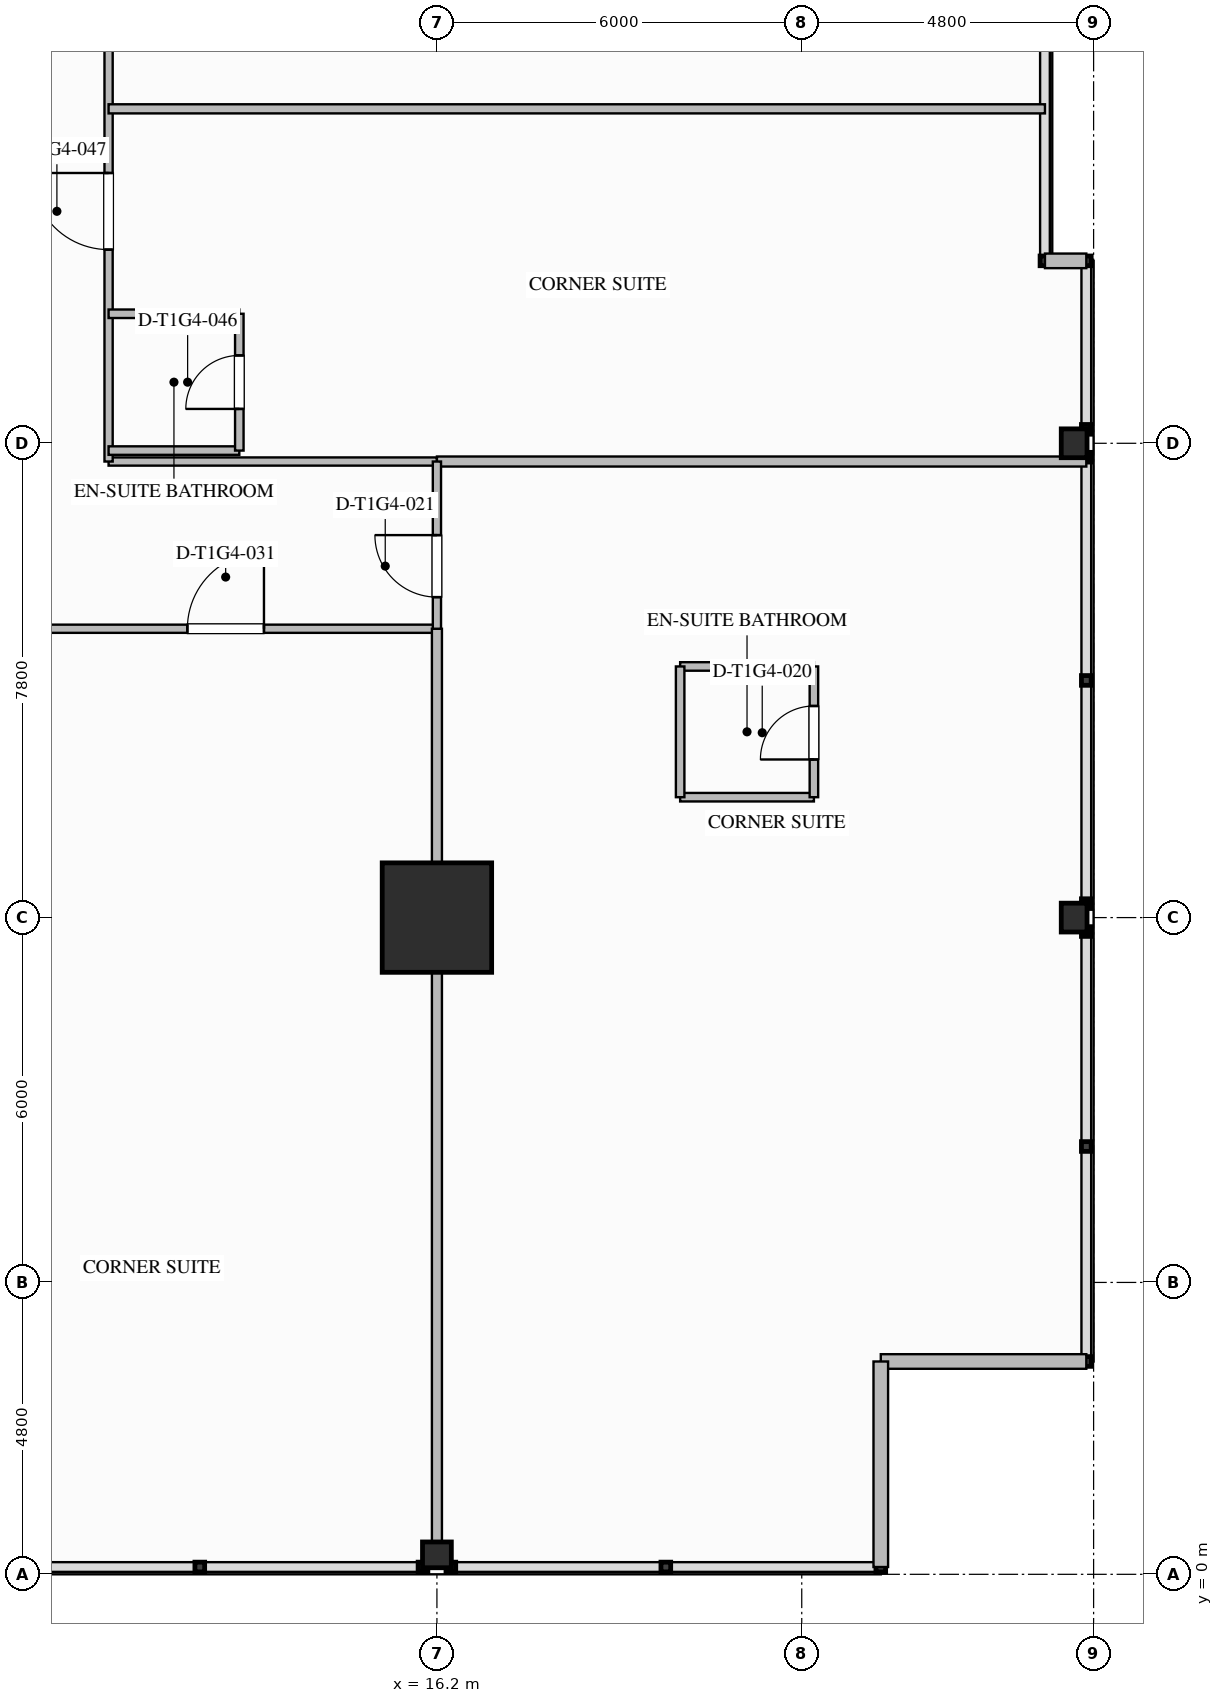
"""IFC4 building model, lengths in metres.
Left out: names, types, materials, properties, quantities, classifications, styles, units other than length and angle.
Written with IfcOpenShell. Run it as: python <this file> out.ifc"""

import sys

from ifc_helpers import new_model, si_unit, direction, frame, frame_2d, origin, origin_2d, place, context, subcontext, project, spatial, rectangle, i_section, extrude, element, fill, save


model = new_model("IFC4")
c1 = context("Model", 3, precision=1e-05, world=origin(), true_north=direction((0.0, 1.0)))
c2 = subcontext(c1, "Body", "Model", "MODEL_VIEW")
j1 = project(units=[si_unit("LENGTHUNIT", "METRE"), si_unit("PLANEANGLEUNIT", "RADIAN")], contexts=[c1])
p1 = place(None, origin())
s1 = spatial("IfcSite", under=j1, at=p1, CompositionType="ELEMENT")
p2 = place(p1, origin())
s2 = spatial("IfcBuilding", under=s1, at=p2, CompositionType="ELEMENT")
p3 = place(p2, frame((0.0, 0.0, 64.7)))
s3 = spatial("IfcBuildingStorey", under=s2, at=p3, CompositionType="ELEMENT", Elevation=64.7)
p4 = place(p3, frame((16.2, 10.8, 0.0), z_axis=(0.0, 0.0, 1.0), x_axis=(1.0, 0.0, 0.0)))
e1 = element("IfcColumn", 1, at=p4, inside=s3, PredefinedType="COLUMN", context=c2, shape_type="SweptSolid", body=[
    extrude(rectangle(XDim=1.8, YDim=1.8, at=origin_2d()), origin(), (0.0, 0.0, 1.0), 3.5),
])
for number, where, z_axis, x_axis in (
    (2, (26.68, 10.8, 0.0), (0.0, 0.0, 1.0), (1.0, 0.0, 0.0)),
    (3, (26.68, 18.6, 0.0), (0.0, 0.0, 1.0), (1.0, 0.0, 0.0)),
    (4, (16.2, 0.32, 0.0), (0.0, 0.0, 1.0), (0.0, 1.0, 0.0)),
):
    element("IfcColumn", number, at=place(p3, frame(where, z_axis=z_axis, x_axis=x_axis)), inside=s3, PredefinedType="COLUMN", context=c2, shape_type="SweptSolid", body=[
        extrude(i_section(OverallWidth=0.424, OverallDepth=0.474, WebThickness=0.048, FlangeThickness=0.077, FilletRadius=0.03, at=origin_2d()), origin(), (0.0, 0.0, 1.0), 3.497),
    ])
for number, where, z_axis, x_axis in (
    (5, (26.88, 3.5, 0.0), (0.0, 0.0, 1.0), (-1.0, 0.0, 0.0)),
    (6, (23.5, 3.5, 0.0), (0.0, 0.0, 1.0), (0.0, -1.0, 0.0)),
):
    element("IfcWall", number, at=place(p3, frame(where, z_axis=z_axis, x_axis=x_axis)), inside=s3, PredefinedType="STANDARD", context=c2, shape_type="SweptSolid", body=[
        extrude(rectangle(XDim=3.38, YDim=0.24, at=frame_2d((1.69, 0.0))), origin(), (0.0, 0.0, 1.0), 3.24),
    ])
p5 = place(p3, frame((26.2, 21.6, 0.0), z_axis=(0.0, 0.0, 1.0), x_axis=(1.0, 0.0, 0.0)))
e7 = element("IfcWall", 7, at=p5, inside=s3, PredefinedType="STANDARD", context=c2, shape_type="SweptSolid", body=[
    extrude(rectangle(XDim=0.68, YDim=0.24, at=frame_2d((0.34, 0.0))), origin(), (0.0, 0.0, 1.0), 3.24),
])
p6 = place(p3, frame((-16.2, 15.55, 0.0), z_axis=(0.0, 0.0, 1.0), x_axis=(1.0, 0.0, 0.0)))
e8 = element("IfcWall", 8, at=p6, inside=s3, PredefinedType="PARTITIONING", context=c2, shape_type="SweptSolid", body=[
    extrude(rectangle(XDim=32.4, YDim=0.135, at=frame_2d((16.2, 0.0))), origin(), (0.0, 0.0, 1.0), 3.24),
])
p7 = place(p6, frame((5.775, 0.0, 0.0)))
e9 = element("IfcOpeningElement", 9, at=p7, cuts=e8, PredefinedType="OPENING", context=c2, shape_type="SweptSolid", body=[
    extrude(rectangle(XDim=1.26, YDim=2.2, at=frame_2d((0.63, 1.1))), frame((0.0, 0.077, 0.0), z_axis=(0.0, -1.0, 0.0), x_axis=(1.0, 0.0, 0.0)), (0.0, 0.0, 1.0), 0.155),
])
p8 = place(p6, frame((17.286, 0.0, 0.0)))
e10 = element("IfcOpeningElement", 10, at=p8, cuts=e8, PredefinedType="OPENING", context=c2, shape_type="SweptSolid", body=[
    extrude(rectangle(XDim=1.26, YDim=2.2, at=frame_2d((0.63, 1.1))), frame((0.0, 0.077, 0.0), z_axis=(0.0, -1.0, 0.0), x_axis=(1.0, 0.0, 0.0)), (0.0, 0.0, 1.0), 0.155),
])
p9 = place(p6, frame((28.295, 0.0, 0.0)))
e11 = element("IfcOpeningElement", 11, at=p9, cuts=e8, PredefinedType="OPENING", context=c2, shape_type="SweptSolid", body=[
    extrude(rectangle(XDim=1.26, YDim=2.2, at=frame_2d((0.63, 1.1))), frame((0.0, 0.077, 0.0), z_axis=(0.0, -1.0, 0.0), x_axis=(1.0, 0.0, 0.0)), (0.0, 0.0, 1.0), 0.155),
])
p10 = place(p3, frame((10.8, 18.3, 0.0), z_axis=(0.0, 0.0, 1.0), x_axis=(1.0, 0.0, 0.0)))
e12 = element("IfcWall", 12, at=p10, inside=s3, PredefinedType="PARTITIONING", context=c2, shape_type="SweptSolid", body=[
    extrude(rectangle(XDim=5.4, YDim=0.135, at=frame_2d((2.7, 0.0))), origin(), (0.0, 0.0, 1.0), 3.24),
])
p11 = place(p3, frame((10.8, 18.3, 0.0), z_axis=(0.0, 0.0, 1.0), x_axis=(0.0, 1.0, 0.0)))
e13 = element("IfcWall", 13, at=p11, inside=s3, PredefinedType="PARTITIONING", context=c2, shape_type="SweptSolid", body=[
    extrude(rectangle(XDim=17.4, YDim=0.135, at=frame_2d((8.7, 0.0))), origin(), (0.0, 0.0, 1.0), 3.24),
])
p12 = place(p11, frame((3.485, 0.0, 0.0)))
e14 = element("IfcOpeningElement", 14, at=p12, cuts=e13, PredefinedType="OPENING", context=c2, shape_type="SweptSolid", body=[
    extrude(rectangle(XDim=1.26, YDim=2.2, at=frame_2d((0.63, 1.1))), frame((0.0, 0.077, 0.0), z_axis=(0.0, -1.0, 0.0), x_axis=(1.0, 0.0, 0.0)), (0.0, 0.0, 1.0), 0.155),
])
p13 = place(p11, frame((8.19, 0.0, 0.0)))
e15 = element("IfcOpeningElement", 15, at=p13, cuts=e13, PredefinedType="OPENING", context=c2, shape_type="SweptSolid", body=[
    extrude(rectangle(XDim=1.02, YDim=2.15, at=frame_2d((0.51, 1.075))), frame((0.0, 0.077, 0.0), z_axis=(0.0, -1.0, 0.0), x_axis=(1.0, 0.0, 0.0)), (0.0, 0.0, 1.0), 0.155),
])
p14 = place(p11, frame((15.085, 0.0, 0.0)))
e16 = element("IfcOpeningElement", 16, at=p14, cuts=e13, PredefinedType="OPENING", context=c2, shape_type="SweptSolid", body=[
    extrude(rectangle(XDim=1.26, YDim=2.2, at=frame_2d((0.63, 1.1))), frame((0.0, 0.077, 0.0), z_axis=(0.0, -1.0, 0.0), x_axis=(1.0, 0.0, 0.0)), (0.0, 0.0, 1.0), 0.155),
])
p15 = place(p3, frame((16.2, 0.12, 0.0), z_axis=(0.0, 0.0, 1.0), x_axis=(0.0, 1.0, 0.0)))
e17 = element("IfcWall", 17, at=p15, inside=s3, PredefinedType="PARTITIONING", context=c2, shape_type="SweptSolid", body=[
    extrude(rectangle(XDim=15.43, YDim=0.165, at=frame_2d((7.715, 0.0))), origin(), (0.0, 0.0, 1.0), 2.452),
])
p16 = place(p3, frame((16.2, 18.3, 0.0), z_axis=(0.0, 0.0, 1.0), x_axis=(1.0, 0.0, 0.0)))
e18 = element("IfcWall", 18, at=p16, inside=s3, PredefinedType="PARTITIONING", context=c2, shape_type="SweptSolid", body=[
    extrude(rectangle(XDim=10.68, YDim=0.165, at=frame_2d((5.34, 0.0))), origin(), (0.0, 0.0, 1.0), 2.452),
])
p17 = place(p3, frame((16.2, 15.55, 0.0), z_axis=(0.0, 0.0, 1.0), x_axis=(0.0, 1.0, 0.0)))
e19 = element("IfcWall", 19, at=p17, inside=s3, PredefinedType="PARTITIONING", context=c2, shape_type="SweptSolid", body=[
    extrude(rectangle(XDim=2.75, YDim=0.135, at=frame_2d((1.375, 0.0))), origin(), (0.0, 0.0, 1.0), 2.452),
])
p18 = place(p17, frame((0.52, 0.0, 0.0)))
e20 = element("IfcOpeningElement", 20, at=p18, cuts=e19, PredefinedType="OPENING", context=c2, shape_type="SweptSolid", body=[
    extrude(rectangle(XDim=1.02, YDim=2.15, at=frame_2d((0.51, 1.075))), frame((0.0, 0.077, 0.0), z_axis=(0.0, -1.0, 0.0), x_axis=(1.0, 0.0, 0.0)), (0.0, 0.0, 1.0), 0.155),
])
for number, where, z_axis, x_axis in (
    (21, (20.2, 12.78, 0.0), (0.0, 0.0, 1.0), (1.0, 0.0, 0.0)),
    (22, (20.2, 14.93, 0.0), (0.0, 0.0, 1.0), (1.0, 0.0, 0.0)),
):
    element("IfcWall", number, at=place(p3, frame(where, z_axis=z_axis, x_axis=x_axis)), inside=s3, PredefinedType="PLUMBINGWALL", context=c2, shape_type="SweptSolid", body=[
        extrude(rectangle(XDim=2.2, YDim=0.14, at=frame_2d((1.1, 0.0))), origin(), (0.0, 0.0, 1.0), 3.24),
    ])
p19 = place(p3, frame((20.2, 12.78, 0.0), z_axis=(0.0, 0.0, 1.0), x_axis=(0.0, 1.0, 0.0)))
e23 = element("IfcWall", 23, at=p19, inside=s3, PredefinedType="PLUMBINGWALL", context=c2, shape_type="SweptSolid", body=[
    extrude(rectangle(XDim=2.15, YDim=0.14, at=frame_2d((1.075, 0.0))), origin(), (0.0, 0.0, 1.0), 3.24),
])
p20 = place(p3, frame((22.4, 12.78, 0.0), z_axis=(0.0, 0.0, 1.0), x_axis=(0.0, 1.0, 0.0)))
e24 = element("IfcWall", 24, at=p20, inside=s3, PredefinedType="PLUMBINGWALL", context=c2, shape_type="SweptSolid", body=[
    extrude(rectangle(XDim=2.15, YDim=0.14, at=frame_2d((1.075, 0.0))), origin(), (0.0, 0.0, 1.0), 3.24),
])
p21 = place(p20, frame((0.62, 0.0, 0.0)))
e25 = element("IfcOpeningElement", 25, at=p21, cuts=e24, PredefinedType="OPENING", context=c2, shape_type="SweptSolid", body=[
    extrude(rectangle(XDim=0.88, YDim=2.1, at=frame_2d((0.44, 1.05))), frame((0.0, 0.08, 0.0), z_axis=(0.0, -1.0, 0.0), x_axis=(1.0, 0.0, 0.0)), (0.0, 0.0, 1.0), 0.16),
])
p22 = place(p3, frame((10.8, 18.48, 0.0), z_axis=(0.0, 0.0, 1.0), x_axis=(1.0, 0.0, 0.0)))
e26 = element("IfcWall", 26, at=p22, inside=s3, PredefinedType="PLUMBINGWALL", context=c2, shape_type="SweptSolid", body=[
    extrude(rectangle(XDim=2.15, YDim=0.14, at=frame_2d((1.075, 0.0))), origin(), (0.0, 0.0, 1.0), 2.617),
])
p23 = place(p3, frame((10.8, 20.73, 0.0), z_axis=(0.0, 0.0, 1.0), x_axis=(1.0, 0.0, 0.0)))
e27 = element("IfcWall", 27, at=p23, inside=s3, PredefinedType="PLUMBINGWALL", context=c2, shape_type="SweptSolid", body=[
    extrude(rectangle(XDim=2.15, YDim=0.14, at=frame_2d((1.075, 0.0))), origin(), (0.0, 0.0, 1.0), 3.24),
])
p24 = place(p3, frame((12.95, 18.48, 0.0), z_axis=(0.0, 0.0, 1.0), x_axis=(0.0, 1.0, 0.0)))
e28 = element("IfcWall", 28, at=p24, inside=s3, PredefinedType="PLUMBINGWALL", context=c2, shape_type="SweptSolid", body=[
    extrude(rectangle(XDim=2.25, YDim=0.14, at=frame_2d((1.125, 0.0))), origin(), (0.0, 0.0, 1.0), 3.24),
])
p25 = place(p24, frame((0.685, 0.0, 0.0)))
e29 = element("IfcOpeningElement", 29, at=p25, cuts=e28, PredefinedType="OPENING", context=c2, shape_type="SweptSolid", body=[
    extrude(rectangle(XDim=0.88, YDim=2.1, at=frame_2d((0.44, 1.05))), frame((0.0, 0.08, 0.0), z_axis=(0.0, -1.0, 0.0), x_axis=(1.0, 0.0, 0.0)), (0.0, 0.0, 1.0), 0.16),
])
p26 = place(p3, frame((10.8, 24.1, 0.0), z_axis=(0.0, 0.0, 1.0), x_axis=(1.0, 0.0, 0.0)))
e30 = element("IfcWall", 30, at=p26, inside=s3, PredefinedType="PARTITIONING", context=c2, shape_type="SweptSolid", body=[
    extrude(rectangle(XDim=15.4, YDim=0.15, at=frame_2d((7.7, 0.0))), origin(), (0.0, 0.0, 1.0), 3.24),
])
p27 = place(p21, origin())
e31 = element("IfcDoor", 31, at=p27, inside=s3, OperationType="SINGLE_SWING_LEFT", PredefinedType="DOOR", context=c2, shape_type="SweptSolid", body=[
    extrude(rectangle(XDim=0.88, YDim=2.1, at=frame_2d((0.44, 1.05))), frame((0.0, 0.025, 0.0), z_axis=(0.0, -1.0, 0.0), x_axis=(1.0, 0.0, 0.0)), (0.0, 0.0, 1.0), 0.05),
])
fill(e25, e31)
p28 = place(p18, origin())
e32 = element("IfcDoor", 32, at=p28, inside=s3, OperationType="SINGLE_SWING_RIGHT", PredefinedType="DOOR", context=c2, shape_type="SweptSolid", body=[
    extrude(rectangle(XDim=1.02, YDim=2.15, at=frame_2d((0.51, 1.075))), frame((0.0, 0.025, 0.0), z_axis=(0.0, -1.0, 0.0), x_axis=(1.0, 0.0, 0.0)), (0.0, 0.0, 1.0), 0.05),
])
fill(e20, e32)
p29 = place(p9, origin())
e33 = element("IfcDoor", 33, at=p29, inside=s3, OperationType="SINGLE_SWING_RIGHT", PredefinedType="DOOR", context=c2, shape_type="SweptSolid", body=[
    extrude(rectangle(XDim=1.26, YDim=2.2, at=frame_2d((0.63, 1.1))), frame((0.0, 0.025, 0.0), z_axis=(0.0, -1.0, 0.0), x_axis=(1.0, 0.0, 0.0)), (0.0, 0.0, 1.0), 0.05),
])
fill(e11, e33)
p30 = place(p25, origin())
e34 = element("IfcDoor", 34, at=p30, inside=s3, OperationType="SINGLE_SWING_LEFT", PredefinedType="DOOR", context=c2, shape_type="SweptSolid", body=[
    extrude(rectangle(XDim=0.88, YDim=2.1, at=frame_2d((0.44, 1.05))), frame((0.0, 0.025, 0.0), z_axis=(0.0, -1.0, 0.0), x_axis=(1.0, 0.0, 0.0)), (0.0, 0.0, 1.0), 0.05),
])
fill(e29, e34)
p31 = place(p12, origin())
e35 = element("IfcDoor", 35, at=p31, inside=s3, OperationType="SINGLE_SWING_RIGHT", PredefinedType="DOOR", context=c2, shape_type="SweptSolid", body=[
    extrude(rectangle(XDim=1.26, YDim=2.2, at=frame_2d((0.63, 1.1))), frame((0.0, 0.025, 0.0), z_axis=(0.0, -1.0, 0.0), x_axis=(1.0, 0.0, 0.0)), (0.0, 0.0, 1.0), 0.05),
])
fill(e14, e35)
save(model, sys.argv[1])
